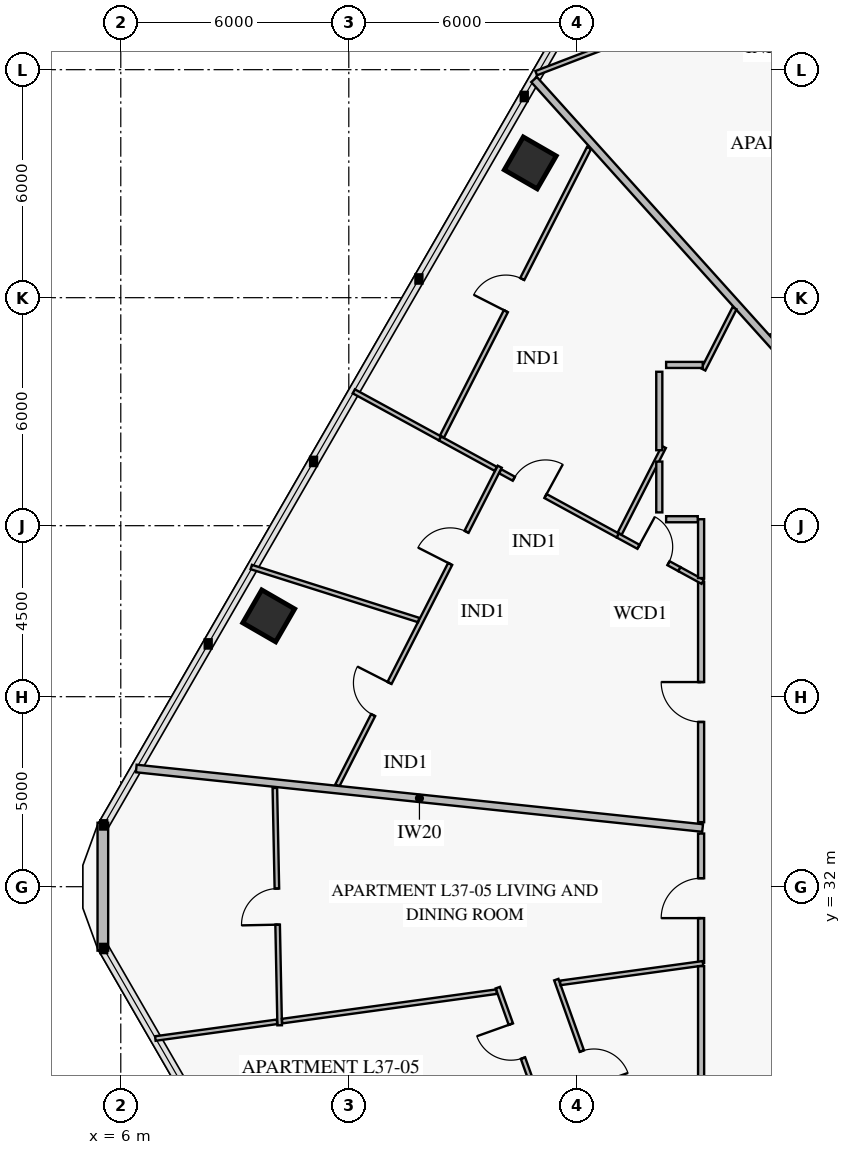
"""IFC4 building model, lengths in metres.
Left out: names, types, materials, properties, quantities, classifications, styles, units other than length and angle.
Written with IfcOpenShell. Run it as: python <this file> out.ifc"""

import sys

from ifc_helpers import new_model, si_unit, direction, frame, frame_2d, origin, origin_2d, place, context, subcontext, project, spatial, rectangle, extrude, element, fill, save


model = new_model("IFC4")
c1 = context("Model", 3, precision=1e-05, world=origin(), true_north=direction((0.0, 1.0)))
c2 = subcontext(c1, "Body", "Model", "MODEL_VIEW")
j1 = project(units=[si_unit("LENGTHUNIT", "METRE"), si_unit("PLANEANGLEUNIT", "RADIAN")], contexts=[c1])
p1 = place(None, origin())
s1 = spatial("IfcSite", under=j1, at=p1, CompositionType="ELEMENT")
p2 = place(p1, origin())
s2 = spatial("IfcBuilding", under=s1, at=p2, CompositionType="ELEMENT")
p3 = place(p2, frame((0.0, 0.0, 150.4)))
s3 = spatial("IfcBuildingStorey", under=s2, at=p3, CompositionType="ELEMENT", Elevation=150.4)
for number, where, z_axis, x_axis in (
    (1, (16.774, 51.047, 0.0), (0.0, 0.0, 1.0), (-0.5, -0.866, 0.0)),
    (2, (9.892, 39.126, 0.0), (0.0, 0.0, 1.0), (-0.5, -0.866, 0.0)),
):
    element("IfcColumn", number, at=place(p3, frame(where, z_axis=z_axis, x_axis=x_axis)), inside=s3, PredefinedType="COLUMN", context=c2, shape_type="SweptSolid", body=[
        extrude(rectangle(XDim=1.0, YDim=1.0, at=origin_2d()), origin(), (0.0, 0.0, 1.0), 3.55),
    ])
p4 = place(p3, frame((5.528, 30.317, 0.0), z_axis=(0.0, 0.0, 1.0), x_axis=(0.0, 1.0, 0.0)))
e3 = element("IfcWall", 3, at=p4, inside=s3, PredefinedType="SOLIDWALL", context=c2, shape_type="SweptSolid", body=[
    extrude(rectangle(XDim=3.365, YDim=0.28, at=frame_2d((1.683, 0.0))), origin(), (0.0, 0.0, 1.0), 3.55),
])
p5 = place(p3, frame((28.598, 57.886, 0.0), z_axis=(0.0, 0.0, 1.0), x_axis=(-0.933574508077, -0.358383367177, 0.0)))
e4 = element("IfcWall", 4, at=p5, inside=s3, PredefinedType="PARTITIONING", context=c2, shape_type="SweptSolid", body=[
    extrude(rectangle(XDim=12.497, YDim=0.12, at=frame_2d((6.249, 0.0))), origin(), (0.0, 0.0, 1.0), 2.87),
])
p6 = place(p5, frame((5.773, 0.0, 0.0)))
e5 = element("IfcOpeningElement", 5, at=p6, cuts=e4, PredefinedType="OPENING", context=c2, shape_type="SweptSolid", body=[
    extrude(rectangle(XDim=0.95, YDim=2.1, at=frame_2d((0.475, 1.05))), frame((0.0, 0.072, 0.0), z_axis=(0.0, -1.0, 0.0), x_axis=(1.0, 0.0, 0.0)), (0.0, 0.0, 1.0), 0.144),
])
p7 = place(p3, frame((15.971, 43.052, 0.0), z_axis=(0.0, 0.0, 1.0), x_axis=(-0.453998461699, -0.891002467323, 0.0)))
e6 = element("IfcWall", 6, at=p7, inside=s3, PredefinedType="PARTITIONING", context=c2, shape_type="SweptSolid", body=[
    extrude(rectangle(XDim=9.41, YDim=0.12, at=frame_2d((4.705, 0.0))), origin(), (0.0, 0.0, 1.0), 2.9),
])
p8 = place(p7, frame((1.923, 0.0, 0.0)))
e7 = element("IfcOpeningElement", 7, at=p8, cuts=e6, PredefinedType="OPENING", context=c2, shape_type="SweptSolid", body=[
    extrude(rectangle(XDim=0.95, YDim=2.1, at=frame_2d((0.475, 1.05))), frame((0.0, 0.072, 0.0), z_axis=(0.0, -1.0, 0.0), x_axis=(1.0, 0.0, 0.0)), (0.0, 0.0, 1.0), 0.144),
])
p9 = place(p7, frame((6.386, 0.0, 0.0)))
e8 = element("IfcOpeningElement", 8, at=p9, cuts=e6, PredefinedType="OPENING", context=c2, shape_type="SweptSolid", body=[
    extrude(rectangle(XDim=0.95, YDim=2.1, at=frame_2d((0.475, 1.05))), frame((0.0, 0.072, 0.0), z_axis=(0.0, -1.0, 0.0), x_axis=(1.0, 0.0, 0.0)), (0.0, 0.0, 1.0), 0.144),
])
p10 = place(p3, frame((20.7, 40.356, 0.0), z_axis=(0.0, 0.0, 1.0), x_axis=(-0.877673715659, 0.479258645035, 0.0)))
e9 = element("IfcWall", 9, at=p10, inside=s3, PredefinedType="PARTITIONING", context=c2, shape_type="SweptSolid", body=[
    extrude(rectangle(XDim=1.851, YDim=0.12, at=frame_2d((0.926, 0.0))), origin(), (0.0, 0.0, 1.0), 3.55),
])
p11 = place(p10, frame((0.327, 0.0, 0.0)))
e10 = element("IfcOpeningElement", 10, at=p11, cuts=e9, PredefinedType="OPENING", context=c2, shape_type="SweptSolid", body=[
    extrude(rectangle(XDim=0.9, YDim=2.1, at=frame_2d((0.45, 1.05))), frame((0.0, 0.072, 0.0), z_axis=(0.0, -1.0, 0.0), x_axis=(1.0, 0.0, 0.0)), (0.0, 0.0, 1.0), 0.144),
])
p12 = place(p3, frame((19.075, 41.243, 0.0), z_axis=(0.0, 0.0, 1.0), x_axis=(-0.877641033672, 0.479318491209, 0.0)))
e11 = element("IfcWall", 11, at=p12, inside=s3, PredefinedType="PARTITIONING", context=c2, shape_type="SweptSolid", body=[
    extrude(rectangle(XDim=3.521, YDim=0.12, at=frame_2d((1.76, 0.0))), origin(), (0.0, 0.0, 1.0), 3.15),
])
p13 = place(p12, frame((2.164, 0.0, 0.0)))
e12 = element("IfcOpeningElement", 12, at=p13, cuts=e11, PredefinedType="OPENING", context=c2, shape_type="SweptSolid", body=[
    extrude(rectangle(XDim=0.95, YDim=2.1, at=frame_2d((0.475, 1.05))), frame((0.0, 0.072, 0.0), z_axis=(0.0, -1.0, 0.0), x_axis=(1.0, 0.0, 0.0)), (0.0, 0.0, 1.0), 0.144),
])
p14 = place(p3, frame((15.866, 42.996, 0.0), z_axis=(0.0, 0.0, 1.0), x_axis=(-0.877627518141, 0.479343237567, 0.0)))
e13 = element("IfcWall", 13, at=p14, inside=s3, PredefinedType="PARTITIONING", context=c2, shape_type="SweptSolid", body=[
    extrude(rectangle(XDim=1.672, YDim=0.12, at=frame_2d((0.836, 0.0))), origin(), (0.0, 0.0, 1.0), 3.55),
])
p15 = place(p3, frame((18.322, 51.44, 0.0), z_axis=(0.0, 0.0, 1.0), x_axis=(-0.453994428703, -0.891004522271, 0.0)))
e14 = element("IfcWall", 14, at=p15, inside=s3, PredefinedType="PARTITIONING", context=c2, shape_type="SweptSolid", body=[
    extrude(rectangle(XDim=8.524, YDim=0.12, at=frame_2d((4.262, 0.0))), origin(), (0.0, 0.0, 1.0), 2.9),
])
p16 = place(p15, frame((3.871, 0.0, 0.0)))
e15 = element("IfcOpeningElement", 15, at=p16, cuts=e14, PredefinedType="OPENING", context=c2, shape_type="SweptSolid", body=[
    extrude(rectangle(XDim=0.95, YDim=2.1, at=frame_2d((0.475, 1.05))), frame((0.0, 0.072, 0.0), z_axis=(0.0, -1.0, 0.0), x_axis=(1.0, 0.0, 0.0)), (0.0, 0.0, 1.0), 0.144),
])
p17 = place(p3, frame((21.27, 40.021, 0.0), z_axis=(0.0, 0.0, 1.0), x_axis=(0.0, -1.0, 0.0)))
e16 = element("IfcWall", 16, at=p17, inside=s3, PredefinedType="PARTITIONING", context=c2, shape_type="SweptSolid", body=[
    extrude(rectangle(XDim=6.323, YDim=0.16, at=frame_2d((3.162, 0.0))), origin(), (0.0, 0.0, 1.0), 2.9),
])
p18 = place(p17, frame((2.637, 0.0, 0.0)))
e17 = element("IfcOpeningElement", 17, at=p18, cuts=e16, PredefinedType="OPENING", context=c2, shape_type="SweptSolid", body=[
    extrude(rectangle(XDim=1.05, YDim=2.15, at=frame_2d((0.525, 1.075))), frame((0.0, 0.092, 0.0), z_axis=(0.0, -1.0, 0.0), x_axis=(1.0, 0.0, 0.0)), (0.0, 0.0, 1.0), 0.184),
])
p19 = place(p3, frame((10.054, 34.599, 0.0), z_axis=(0.0, 0.0, 1.0), x_axis=(0.020243671552, -0.999795075884, 0.0)))
e18 = element("IfcWall", 18, at=p19, inside=s3, PredefinedType="PARTITIONING", context=c2, shape_type="SweptSolid", body=[
    extrude(rectangle(XDim=6.247, YDim=0.12, at=frame_2d((3.124, 0.0))), origin(), (0.0, 0.0, 1.0), 2.87),
])
p20 = place(p19, frame((2.648, 0.0, 0.0)))
e19 = element("IfcOpeningElement", 19, at=p20, cuts=e18, PredefinedType="OPENING", context=c2, shape_type="SweptSolid", body=[
    extrude(rectangle(XDim=0.95, YDim=2.1, at=frame_2d((0.475, 1.05))), frame((0.0, 0.072, 0.0), z_axis=(0.0, -1.0, 0.0), x_axis=(1.0, 0.0, 0.0)), (0.0, 0.0, 1.0), 0.144),
])
p21 = place(p3, frame((17.46, 29.555, 0.0), z_axis=(0.0, 0.0, 1.0), x_axis=(0.336444483984, -0.941703302106, 0.0)))
e20 = element("IfcWall", 20, at=p21, inside=s3, PredefinedType="PARTITIONING", context=c2, shape_type="SweptSolid", body=[
    extrude(rectangle(XDim=7.87, YDim=0.12, at=frame_2d((3.935, 0.0))), origin(), (0.0, 0.0, 1.0), 2.9),
])
p22 = place(p21, frame((1.997, 0.0, 0.0)))
e21 = element("IfcOpeningElement", 21, at=p22, cuts=e20, PredefinedType="OPENING", context=c2, shape_type="SweptSolid", body=[
    extrude(rectangle(XDim=0.95, YDim=2.1, at=frame_2d((0.475, 1.05))), frame((0.0, 0.072, 0.0), z_axis=(0.0, -1.0, 0.0), x_axis=(1.0, 0.0, 0.0)), (0.0, 0.0, 1.0), 0.144),
])
p23 = place(p21, frame((5.855, 0.0, 0.0)))
e22 = element("IfcOpeningElement", 22, at=p23, cuts=e20, PredefinedType="OPENING", context=c2, shape_type="SweptSolid", body=[
    extrude(rectangle(XDim=0.9, YDim=2.1, at=frame_2d((0.45, 1.05))), frame((0.0, 0.072, 0.0), z_axis=(0.0, -1.0, 0.0), x_axis=(1.0, 0.0, 0.0)), (0.0, 0.0, 1.0), 0.144),
])
p24 = place(p3, frame((15.921, 29.343, 0.0), z_axis=(0.0, 0.0, 1.0), x_axis=(0.336440023532, -0.941704895689, 0.0)))
e23 = element("IfcWall", 23, at=p24, inside=s3, PredefinedType="PARTITIONING", context=c2, shape_type="SweptSolid", body=[
    extrude(rectangle(XDim=8.507, YDim=0.12, at=frame_2d((4.253, 0.0))), origin(), (0.0, 0.0, 1.0), 2.9),
])
p25 = place(p24, frame((1.019, 0.0, 0.0)))
e24 = element("IfcOpeningElement", 24, at=p25, cuts=e23, PredefinedType="OPENING", context=c2, shape_type="SweptSolid", body=[
    extrude(rectangle(XDim=0.95, YDim=2.1, at=frame_2d((0.475, 1.05))), frame((0.0, 0.072, 0.0), z_axis=(0.0, -1.0, 0.0), x_axis=(1.0, 0.0, 0.0)), (0.0, 0.0, 1.0), 0.144),
])
p26 = place(p24, frame((3.779, 0.0, 0.0)))
e25 = element("IfcOpeningElement", 25, at=p26, cuts=e23, PredefinedType="OPENING", context=c2, shape_type="SweptSolid", body=[
    extrude(rectangle(XDim=0.95, YDim=2.1, at=frame_2d((0.475, 1.05))), frame((0.0, 0.072, 0.0), z_axis=(0.0, -1.0, 0.0), x_axis=(1.0, 0.0, 0.0)), (0.0, 0.0, 1.0), 0.144),
])
p27 = place(p24, frame((6.538, 0.0, 0.0)))
e26 = element("IfcOpeningElement", 26, at=p27, cuts=e23, PredefinedType="OPENING", context=c2, shape_type="SweptSolid", body=[
    extrude(rectangle(XDim=0.95, YDim=2.1, at=frame_2d((0.475, 1.05))), frame((0.0, 0.072, 0.0), z_axis=(0.0, -1.0, 0.0), x_axis=(1.0, 0.0, 0.0)), (0.0, 0.0, 1.0), 0.144),
])
p28 = place(p3, frame((21.27, 33.398, 0.0), z_axis=(0.0, 0.0, 1.0), x_axis=(0.0, -1.0, 0.0)))
e27 = element("IfcWall", 27, at=p28, inside=s3, PredefinedType="PARTITIONING", context=c2, shape_type="SweptSolid", body=[
    extrude(rectangle(XDim=3.401, YDim=0.16, at=frame_2d((1.7, 0.0))), origin(), (0.0, 0.0, 1.0), 3.55),
])
p29 = place(p28, frame((1.176, 0.0, 0.0)))
e28 = element("IfcOpeningElement", 28, at=p29, cuts=e27, PredefinedType="OPENING", context=c2, shape_type="SweptSolid", body=[
    extrude(rectangle(XDim=1.05, YDim=2.15, at=frame_2d((0.525, 1.075))), frame((0.0, 0.092, 0.0), z_axis=(0.0, -1.0, 0.0), x_axis=(1.0, 0.0, 0.0)), (0.0, 0.0, 1.0), 0.184),
])
p30 = place(p3, frame((30.895, 49.465, 0.0), z_axis=(0.0, 0.0, 1.0), x_axis=(-0.933572192245, -0.358389399769, 0.0)))
e29 = element("IfcWall", 29, at=p30, inside=s3, PredefinedType="PARTITIONING", context=c2, shape_type="SweptSolid", body=[
    extrude(rectangle(XDim=8.38, YDim=0.12, at=frame_2d((4.19, 0.0))), origin(), (0.0, 0.0, 1.0), 3.55),
])
p31 = place(p3, frame((23.674, 45.69, 0.0), z_axis=(0.0, 0.0, 1.0), x_axis=(-0.669133315117, 0.743142386492, 0.0)))
e30 = element("IfcWall", 30, at=p31, inside=s3, PredefinedType="PARTITIONING", context=c2, shape_type="SweptSolid", body=[
    extrude(rectangle(XDim=10.16, YDim=0.2, at=frame_2d((5.08, 0.0))), origin(), (0.0, 0.0, 1.0), 2.87),
])
p32 = place(p3, frame((13.839, 39.017, 0.0), z_axis=(0.0, 0.0, 1.0), x_axis=(-0.953341211611, 0.30189490596, 0.0)))
e31 = element("IfcWall", 31, at=p32, inside=s3, PredefinedType="PARTITIONING", context=c2, shape_type="SweptSolid", body=[
    extrude(rectangle(XDim=4.621, YDim=0.12, at=frame_2d((2.311, 0.0))), origin(), (0.0, 0.0, 1.0), 2.87),
])
p33 = place(p3, frame((21.312, 40.021, 0.0), z_axis=(0.0, 0.0, 1.0), x_axis=(-0.877587577205, 0.479416358018, 0.0)))
e32 = element("IfcWall", 32, at=p33, inside=s3, PredefinedType="PARTITIONING", context=c2, shape_type="SweptSolid", body=[
    extrude(rectangle(XDim=0.697, YDim=0.12, at=frame_2d((0.349, 0.0))), origin(), (0.0, 0.0, 1.0), 3.55),
])
p34 = place(p3, frame((14.399, 43.797, 0.0), z_axis=(0.0, 0.0, 1.0), x_axis=(-0.877682394772, 0.4792427505, 0.0)))
e33 = element("IfcWall", 33, at=p34, inside=s3, PredefinedType="PARTITIONING", context=c2, shape_type="SweptSolid", body=[
    extrude(rectangle(XDim=2.583, YDim=0.12, at=frame_2d((1.292, 0.0))), origin(), (0.0, 0.0, 1.0), 2.87),
])
p35 = place(p3, frame((22.149, 47.221, 0.0), z_axis=(0.0, 0.0, 1.0), x_axis=(-0.453952076252, -0.891026100889, 0.0)))
e34 = element("IfcWall", 34, at=p35, inside=s3, PredefinedType="PARTITIONING", context=c2, shape_type="SweptSolid", body=[
    extrude(rectangle(XDim=1.808, YDim=0.12, at=frame_2d((0.904, 0.0))), origin(), (0.0, 0.0, 1.0), 2.9),
])
p36 = place(p3, frame((20.29, 43.572, 0.0), z_axis=(0.0, 0.0, 1.0), x_axis=(-0.453992946101, -0.891005277701, 0.0)))
e35 = element("IfcWall", 35, at=p36, inside=s3, PredefinedType="PARTITIONING", context=c2, shape_type="SweptSolid", body=[
    extrude(rectangle(XDim=2.559, YDim=0.12, at=frame_2d((1.28, 0.0))), origin(), (0.0, 0.0, 1.0), 3.55),
])
p37 = place(p3, frame((21.31, 33.544, 0.0), z_axis=(0.0, 0.0, 1.0), x_axis=(-0.994521332404, 0.104533819379, 0.0)))
e36 = element("IfcWall", 36, at=p37, inside=s3, PredefinedType="PARTITIONING", context=c2, shape_type="SweptSolid", body=[
    extrude(rectangle(XDim=14.985, YDim=0.2, at=frame_2d((7.492, 0.0))), origin(), (0.0, 0.0, 1.0), 2.87),
])
p38 = place(p3, frame((21.32, 29.984, 0.0), z_axis=(0.0, 0.0, 1.0), x_axis=(-0.990693713304, -0.136110126076, 0.0)))
e37 = element("IfcWall", 37, at=p38, inside=s3, PredefinedType="PARTITIONING", context=c2, shape_type="SweptSolid", body=[
    extrude(rectangle(XDim=3.792, YDim=0.12, at=frame_2d((1.896, 0.0))), origin(), (0.0, 0.0, 1.0), 3.55),
])
p39 = place(p3, frame((15.887, 29.238, 0.0), z_axis=(0.0, 0.0, 1.0), x_axis=(-0.990693446478, -0.136112068181, 0.0)))
e38 = element("IfcWall", 38, at=p39, inside=s3, PredefinedType="PARTITIONING", context=c2, shape_type="SweptSolid", body=[
    extrude(rectangle(XDim=5.693, YDim=0.12, at=frame_2d((2.847, 0.0))), origin(), (0.0, 0.0, 1.0), 3.55),
])
p40 = place(p3, frame((10.111, 28.444, 0.0), z_axis=(0.0, 0.0, 1.0), x_axis=(-0.990699601651, -0.136067260167, 0.0)))
e39 = element("IfcWall", 39, at=p40, inside=s3, PredefinedType="PARTITIONING", context=c2, shape_type="SweptSolid", body=[
    extrude(rectangle(XDim=3.231, YDim=0.12, at=frame_2d((1.616, 0.0))), origin(), (0.0, 0.0, 1.0), 2.87),
])
p41 = place(p3, frame((21.27, 41.67, 0.0), z_axis=(0.0, 0.0, 1.0), x_axis=(0.0, -1.0, 0.0)))
e40 = element("IfcWall", 40, at=p41, inside=s3, PredefinedType="PARTITIONING", context=c2, shape_type="SweptSolid", body=[
    extrude(rectangle(XDim=1.548, YDim=0.16, at=frame_2d((0.774, 0.0))), origin(), (0.0, 0.0, 1.0), 3.55),
])
p42 = place(p3, frame((20.17, 43.187, 0.0), z_axis=(0.0, 0.0, 1.0), x_axis=(0.0, -1.0, 0.0)))
e41 = element("IfcWall", 41, at=p42, inside=s3, PredefinedType="PARTITIONING", context=c2, shape_type="SweptSolid", body=[
    extrude(rectangle(XDim=1.336, YDim=0.16, at=frame_2d((0.668, 0.0))), origin(), (0.0, 0.0, 1.0), 3.55),
])
p43 = place(p3, frame((20.35, 41.67, 0.0), z_axis=(0.0, 0.0, 1.0), x_axis=(1.0, 0.0, 0.0)))
e42 = element("IfcWall", 42, at=p43, inside=s3, PredefinedType="PARTITIONING", context=c2, shape_type="SweptSolid", body=[
    extrude(rectangle(XDim=0.832, YDim=0.16, at=frame_2d((0.416, 0.0))), origin(), (0.0, 0.0, 1.0), 3.55),
])
p44 = place(p3, frame((20.17, 45.55, 0.0), z_axis=(0.0, 0.0, 1.0), x_axis=(0.0, -1.0, 0.0)))
e43 = element("IfcWall", 43, at=p44, inside=s3, PredefinedType="PARTITIONING", context=c2, shape_type="SweptSolid", body=[
    extrude(rectangle(XDim=2.064, YDim=0.16, at=frame_2d((1.032, 0.0))), origin(), (0.0, 0.0, 1.0), 3.15),
])
p45 = place(p3, frame((21.313, 45.73, 0.0), z_axis=(0.0, 0.0, 1.0), x_axis=(-1.0, 0.0, 0.0)))
e44 = element("IfcWall", 44, at=p45, inside=s3, PredefinedType="PARTITIONING", context=c2, shape_type="SweptSolid", body=[
    extrude(rectangle(XDim=0.963, YDim=0.16, at=frame_2d((0.481, 0.0))), origin(), (0.0, 0.0, 1.0), 3.15),
])
p46 = place(p3, frame((21.27, 29.908, 0.0), z_axis=(0.0, 0.0, 1.0), x_axis=(0.0, -1.0, 0.0)))
e45 = element("IfcWall", 45, at=p46, inside=s3, PredefinedType="PARTITIONING", context=c2, shape_type="SweptSolid", body=[
    extrude(rectangle(XDim=3.937, YDim=0.16, at=frame_2d((1.968, 0.0))), origin(), (0.0, 0.0, 1.0), 2.9),
])
p47 = place(p8, frame((0.95, 0.0, 0.0), z_axis=(0.0, 0.0, 1.0), x_axis=(-1.0, 0.0, 0.0)))
e46 = element("IfcDoor", 46, at=p47, inside=s3, OperationType="SINGLE_SWING_LEFT", PredefinedType="DOOR", context=c2, shape_type="SweptSolid", body=[
    extrude(rectangle(XDim=0.95, YDim=2.1, at=frame_2d((0.475, 1.05))), frame((0.0, 0.025, 0.0), z_axis=(0.0, -1.0, 0.0), x_axis=(1.0, 0.0, 0.0)), (0.0, 0.0, 1.0), 0.05),
])
fill(e7, e46)
p48 = place(p9, frame((0.95, 0.0, 0.0), z_axis=(0.0, 0.0, 1.0), x_axis=(-1.0, 0.0, 0.0)))
e47 = element("IfcDoor", 47, at=p48, inside=s3, OperationType="SINGLE_SWING_RIGHT", PredefinedType="DOOR", context=c2, shape_type="SweptSolid", body=[
    extrude(rectangle(XDim=0.95, YDim=2.1, at=frame_2d((0.475, 1.05))), frame((0.0, 0.025, 0.0), z_axis=(0.0, -1.0, 0.0), x_axis=(1.0, 0.0, 0.0)), (0.0, 0.0, 1.0), 0.05),
])
fill(e8, e47)
p49 = place(p11, frame((0.9, 0.0, 0.0), z_axis=(0.0, 0.0, 1.0), x_axis=(-1.0, 0.0, 0.0)))
e48 = element("IfcDoor", 48, at=p49, inside=s3, OperationType="SINGLE_SWING_LEFT", PredefinedType="DOOR", context=c2, shape_type="SweptSolid", body=[
    extrude(rectangle(XDim=0.9, YDim=2.1, at=frame_2d((0.45, 1.05))), frame((0.0, 0.025, 0.0), z_axis=(0.0, -1.0, 0.0), x_axis=(1.0, 0.0, 0.0)), (0.0, 0.0, 1.0), 0.05),
])
fill(e10, e48)
p50 = place(p13, frame((0.95, 0.0, 0.0), z_axis=(0.0, 0.0, 1.0), x_axis=(-1.0, 0.0, 0.0)))
e49 = element("IfcDoor", 49, at=p50, inside=s3, OperationType="SINGLE_SWING_RIGHT", PredefinedType="DOOR", context=c2, shape_type="SweptSolid", body=[
    extrude(rectangle(XDim=0.95, YDim=2.1, at=frame_2d((0.475, 1.05))), frame((0.0, 0.025, 0.0), z_axis=(0.0, -1.0, 0.0), x_axis=(1.0, 0.0, 0.0)), (0.0, 0.0, 1.0), 0.05),
])
fill(e12, e49)
p51 = place(p16, frame((0.95, 0.0, 0.0), z_axis=(0.0, 0.0, 1.0), x_axis=(-1.0, 0.0, 0.0)))
e50 = element("IfcDoor", 50, at=p51, inside=s3, OperationType="SINGLE_SWING_LEFT", PredefinedType="DOOR", context=c2, shape_type="SweptSolid", body=[
    extrude(rectangle(XDim=0.95, YDim=2.1, at=frame_2d((0.475, 1.05))), frame((0.0, 0.025, 0.0), z_axis=(0.0, -1.0, 0.0), x_axis=(1.0, 0.0, 0.0)), (0.0, 0.0, 1.0), 0.05),
])
fill(e15, e50)
p52 = place(p18, frame((1.05, 0.0, 0.0), z_axis=(0.0, 0.0, 1.0), x_axis=(-1.0, 0.0, 0.0)))
e51 = element("IfcDoor", 51, at=p52, inside=s3, OperationType="SINGLE_SWING_RIGHT", PredefinedType="DOOR", context=c2, shape_type="SweptSolid", body=[
    extrude(rectangle(XDim=1.05, YDim=2.15, at=frame_2d((0.525, 1.075))), frame((0.0, 0.025, 0.0), z_axis=(0.0, -1.0, 0.0), x_axis=(1.0, 0.0, 0.0)), (0.0, 0.0, 1.0), 0.05),
])
fill(e17, e51)
p53 = place(p20, frame((0.95, 0.0, 0.0), z_axis=(0.0, 0.0, 1.0), x_axis=(-1.0, 0.0, 0.0)))
e52 = element("IfcDoor", 52, at=p53, inside=s3, OperationType="SINGLE_SWING_LEFT", PredefinedType="DOOR", context=c2, shape_type="SweptSolid", body=[
    extrude(rectangle(XDim=0.95, YDim=2.1, at=frame_2d((0.475, 1.05))), frame((0.0, 0.025, 0.0), z_axis=(0.0, -1.0, 0.0), x_axis=(1.0, 0.0, 0.0)), (0.0, 0.0, 1.0), 0.05),
])
fill(e19, e52)
p54 = place(p22, origin())
e53 = element("IfcDoor", 53, at=p54, inside=s3, OperationType="SINGLE_SWING_RIGHT", PredefinedType="DOOR", context=c2, shape_type="SweptSolid", body=[
    extrude(rectangle(XDim=0.95, YDim=2.1, at=frame_2d((0.475, 1.05))), frame((0.0, 0.025, 0.0), z_axis=(0.0, -1.0, 0.0), x_axis=(1.0, 0.0, 0.0)), (0.0, 0.0, 1.0), 0.05),
])
fill(e21, e53)
p55 = place(p25, frame((0.95, 0.0, 0.0), z_axis=(0.0, 0.0, 1.0), x_axis=(-1.0, 0.0, 0.0)))
e54 = element("IfcDoor", 54, at=p55, inside=s3, OperationType="SINGLE_SWING_RIGHT", PredefinedType="DOOR", context=c2, shape_type="SweptSolid", body=[
    extrude(rectangle(XDim=0.95, YDim=2.1, at=frame_2d((0.475, 1.05))), frame((0.0, 0.025, 0.0), z_axis=(0.0, -1.0, 0.0), x_axis=(1.0, 0.0, 0.0)), (0.0, 0.0, 1.0), 0.05),
])
fill(e24, e54)
p56 = place(p29, frame((1.05, 0.0, 0.0), z_axis=(0.0, 0.0, 1.0), x_axis=(-1.0, 0.0, 0.0)))
e55 = element("IfcDoor", 55, at=p56, inside=s3, OperationType="SINGLE_SWING_LEFT", PredefinedType="DOOR", context=c2, shape_type="SweptSolid", body=[
    extrude(rectangle(XDim=1.05, YDim=2.15, at=frame_2d((0.525, 1.075))), frame((0.0, 0.025, 0.0), z_axis=(0.0, -1.0, 0.0), x_axis=(1.0, 0.0, 0.0)), (0.0, 0.0, 1.0), 0.05),
])
fill(e28, e55)
save(model, sys.argv[1])
